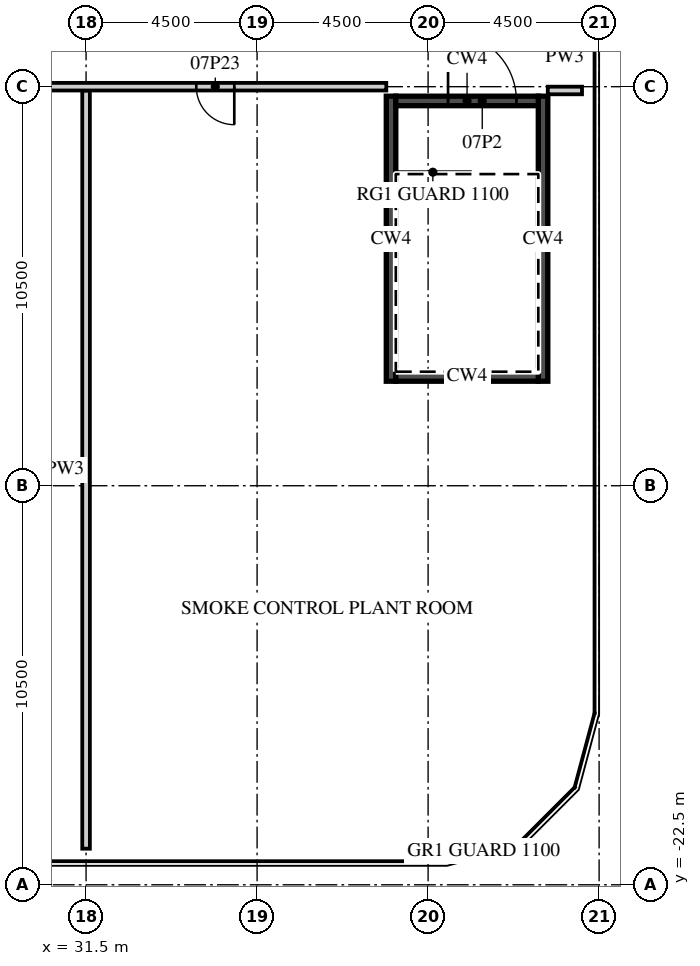
"""IFC4 building model, lengths in metres.
Left out: names, types, materials, properties, quantities, classifications, styles, units other than length and angle.
Written with IfcOpenShell. Run it as: python <this file> out.ifc"""

import sys

from ifc_helpers import new_model, si_unit, direction, frame, frame_2d, origin, place, context, subcontext, project, spatial, rectangle, extrude, element, fill, save


model = new_model("IFC4")
c1 = context("Model", 3, precision=1e-05, world=origin(), true_north=direction((0.0, 1.0)))
c2 = subcontext(c1, "Body", "Model", "MODEL_VIEW")
j1 = project(units=[si_unit("LENGTHUNIT", "METRE"), si_unit("PLANEANGLEUNIT", "RADIAN")], contexts=[c1])
p1 = place(None, origin())
s1 = spatial("IfcSite", under=j1, at=p1, CompositionType="ELEMENT")
p2 = place(p1, origin())
s2 = spatial("IfcBuilding", under=s1, at=p2, CompositionType="ELEMENT")
p3 = place(p2, frame((0.0, 0.0, 47.0)))
s3 = spatial("IfcBuildingStorey", under=s2, at=p3, CompositionType="ELEMENT", Elevation=47.0)
for number, where, z_axis, x_axis in (
    (1, (39.525, -9.25, 0.0), (0.0, 0.0, 1.0), (0.0, 1.0, 0.0)),
    (2, (43.525, -9.25, 0.0), (0.0, 0.0, 1.0), (0.0, 1.0, 0.0)),
):
    element("IfcWall", number, at=place(p3, frame(where, z_axis=z_axis, x_axis=x_axis)), inside=s3, PredefinedType="SHEAR", context=c2, shape_type="SweptSolid", body=[
        extrude(rectangle(XDim=7.5, YDim=0.25, at=frame_2d((3.75, 0.0))), origin(), (0.0, 0.0, 1.0), 5.6),
    ])
p4 = place(p3, frame((39.65, -9.125, 0.0), z_axis=(0.0, 0.0, 1.0), x_axis=(1.0, 0.0, 0.0)))
e3 = element("IfcWall", 3, at=p4, inside=s3, PredefinedType="SHEAR", context=c2, shape_type="SweptSolid", body=[
    extrude(rectangle(XDim=3.75, YDim=0.25, at=frame_2d((1.875, 0.0))), origin(), (0.0, 0.0, 1.0), 5.6),
])
p5 = place(p3, frame((39.65, -1.875, 0.0), z_axis=(0.0, 0.0, 1.0), x_axis=(1.0, 0.0, 0.0)))
e4 = element("IfcWall", 4, at=p5, inside=s3, PredefinedType="SHEAR", context=c2, shape_type="SweptSolid", body=[
    extrude(rectangle(XDim=3.75, YDim=0.25, at=frame_2d((1.875, 0.0))), origin(), (0.0, 0.0, 1.0), 5.6),
])
p6 = place(p5, frame((1.375, 0.0, 0.0)))
e5 = element("IfcOpeningElement", 5, at=p6, cuts=e4, PredefinedType="OPENING", context=c2, shape_type="SweptSolid", body=[
    extrude(rectangle(XDim=1.8, YDim=2.1, at=frame_2d((0.9, 1.05))), frame((0.0, 0.135, 0.0), z_axis=(0.0, -1.0, 0.0), x_axis=(1.0, 0.0, 0.0)), (0.0, 0.0, 1.0), 0.27),
])
p7 = place(p3, frame((31.5, -21.55, 0.0), z_axis=(0.0, 0.0, 1.0), x_axis=(0.0, 1.0, 0.0)))
e6 = element("IfcWall", 6, at=p7, inside=s3, PredefinedType="PARTITIONING", context=c2, shape_type="SweptSolid", body=[
    extrude(rectangle(XDim=19.95, YDim=0.2, at=frame_2d((9.975, 0.0))), origin(), (0.0, 0.0, 1.0), 5.6),
])
p8 = place(p3, frame((-13.3, -1.5, 0.0), z_axis=(0.0, 0.0, 1.0), x_axis=(1.0, 0.0, 0.0)))
e7 = element("IfcWall", 7, at=p8, inside=s3, PredefinedType="PARTITIONING", context=c2, shape_type="SweptSolid", body=[
    extrude(rectangle(XDim=52.7, YDim=0.2, at=frame_2d((26.35, 0.0))), origin(), (0.0, 0.0, 1.0), 5.6),
])
p9 = place(p8, frame((4.71, 0.0, 0.0)))
e8 = element("IfcOpeningElement", 8, at=p9, cuts=e7, PredefinedType="OPENING", context=c2, shape_type="SweptSolid", body=[
    extrude(rectangle(XDim=1.8, YDim=2.1, at=frame_2d((0.9, 1.05))), frame((0.0, 0.11, 0.0), z_axis=(0.0, -1.0, 0.0), x_axis=(1.0, 0.0, 0.0)), (0.0, 0.0, 1.0), 0.22),
])
p10 = place(p8, frame((11.09, 0.0, 0.0)))
e9 = element("IfcOpeningElement", 9, at=p10, cuts=e7, PredefinedType="OPENING", context=c2, shape_type="SweptSolid", body=[
    extrude(rectangle(XDim=1.8, YDim=2.1, at=frame_2d((0.9, 1.05))), frame((0.0, 0.11, 0.0), z_axis=(0.0, -1.0, 0.0), x_axis=(1.0, 0.0, 0.0)), (0.0, 0.0, 1.0), 0.22),
])
p11 = place(p8, frame((20.225, 0.0, 0.0)))
e10 = element("IfcOpeningElement", 10, at=p11, cuts=e7, PredefinedType="OPENING", context=c2, shape_type="SweptSolid", body=[
    extrude(rectangle(XDim=1.2, YDim=2.1, at=frame_2d((0.6, 1.05))), frame((0.0, 0.11, 0.0), z_axis=(0.0, -1.0, 0.0), x_axis=(1.0, 0.0, 0.0)), (0.0, 0.0, 1.0), 0.22),
])
p12 = place(p8, frame((31.9, 0.0, 0.0)))
e11 = element("IfcOpeningElement", 11, at=p12, cuts=e7, PredefinedType="OPENING", context=c2, shape_type="SweptSolid", body=[
    extrude(rectangle(XDim=1.0, YDim=2.1, at=frame_2d((0.5, 1.05))), frame((0.0, 0.11, 0.0), z_axis=(0.0, -1.0, 0.0), x_axis=(1.0, 0.0, 0.0)), (0.0, 0.0, 1.0), 0.22),
])
p13 = place(p8, frame((40.9, 0.0, 0.0)))
e12 = element("IfcOpeningElement", 12, at=p13, cuts=e7, PredefinedType="OPENING", context=c2, shape_type="SweptSolid", body=[
    extrude(rectangle(XDim=1.8, YDim=2.1, at=frame_2d((0.9, 1.05))), frame((0.0, 0.11, 0.0), z_axis=(0.0, -1.0, 0.0), x_axis=(1.0, 0.0, 0.0)), (0.0, 0.0, 1.0), 0.22),
])
p14 = place(p8, frame((47.7, 0.0, 0.0)))
e13 = element("IfcOpeningElement", 13, at=p14, cuts=e7, PredefinedType="OPENING", context=c2, shape_type="SweptSolid", body=[
    extrude(rectangle(XDim=1.0, YDim=2.1, at=frame_2d((0.5, 1.05))), frame((0.0, 0.11, 0.0), z_axis=(0.0, -1.0, 0.0), x_axis=(1.0, 0.0, 0.0)), (0.0, 0.0, 1.0), 0.22),
])
p15 = place(p3, frame((43.65, -1.6, 0.0), z_axis=(0.0, 0.0, 1.0), x_axis=(1.0, 0.0, 0.0)))
e14 = element("IfcWall", 14, at=p15, inside=s3, PredefinedType="PARTITIONING", context=c2, shape_type="SweptSolid", body=[
    extrude(rectangle(XDim=0.9, YDim=0.2, at=frame_2d((0.45, 0.0))), origin(), (0.0, 0.0, 1.0), 5.6),
])
p16 = place(p6, origin())
e15 = element("IfcDoor", 15, at=p16, inside=s3, OperationType="DOUBLE_DOOR_DOUBLE_SWING", PredefinedType="DOOR", context=c2, shape_type="SweptSolid", body=[
    extrude(rectangle(XDim=1.8, YDim=2.1, at=frame_2d((0.9, 1.05))), frame((0.0, 0.025, 0.0), z_axis=(0.0, -1.0, 0.0), x_axis=(1.0, 0.0, 0.0)), (0.0, 0.0, 1.0), 0.05),
])
fill(e5, e15)
p17 = place(p14, origin())
e16 = element("IfcDoor", 16, at=p17, inside=s3, OperationType="SINGLE_SWING_RIGHT", PredefinedType="DOOR", context=c2, shape_type="SweptSolid", body=[
    extrude(rectangle(XDim=1.0, YDim=2.1, at=frame_2d((0.5, 1.05))), frame((0.0, 0.025, 0.0), z_axis=(0.0, -1.0, 0.0), x_axis=(1.0, 0.0, 0.0)), (0.0, 0.0, 1.0), 0.05),
])
fill(e13, e16)
save(model, sys.argv[1])
